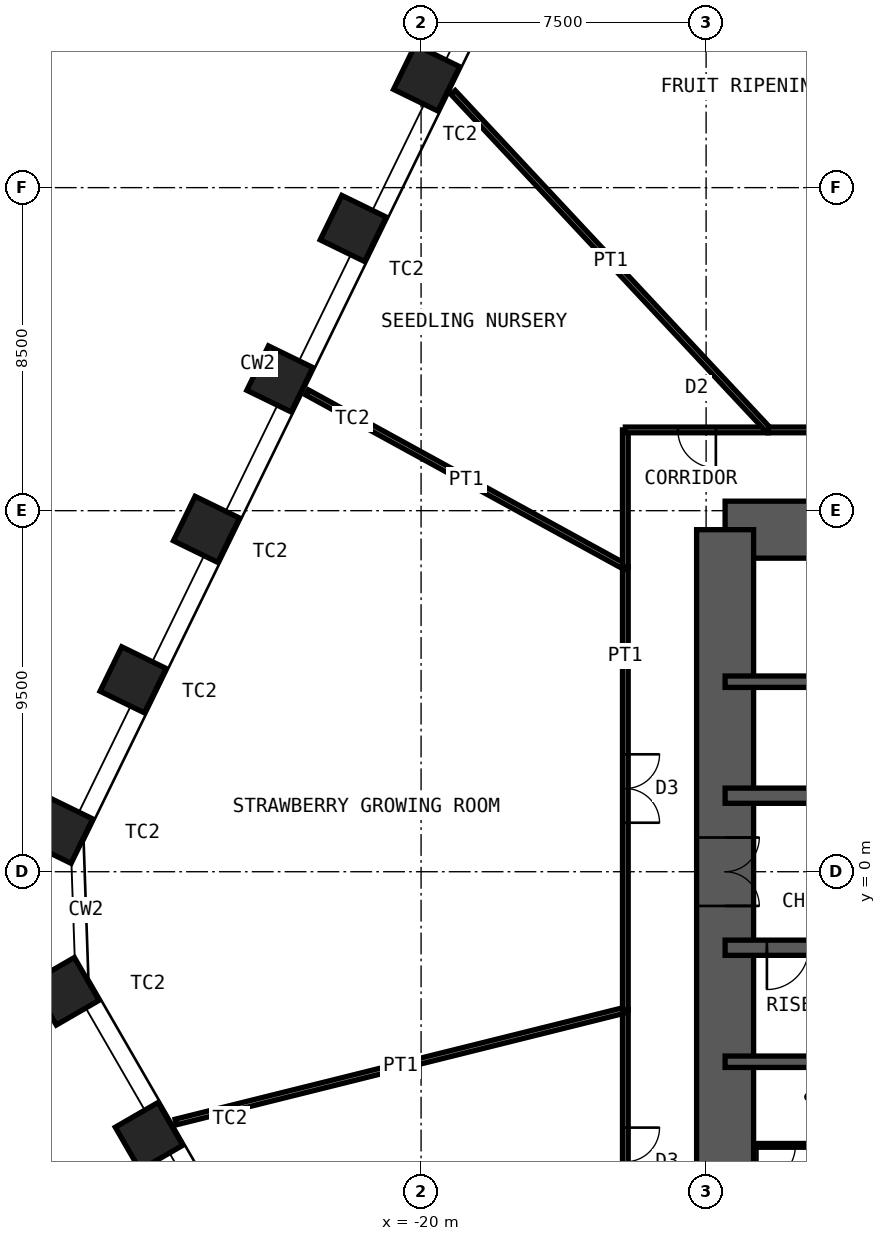
"""IFC4 building model, lengths in metres.
Left out: names, types, materials, properties, quantities, classifications, styles, units other than length and angle.
Written with IfcOpenShell. Run it as: python <this file> out.ifc"""

import sys

from ifc_helpers import new_model, si_unit, direction, frame, frame_2d, origin, origin_2d, place, context, subcontext, project, spatial, rectangle, hollow_rectangle, extrude, element, fill, save


model = new_model("IFC4")
c1 = context("Model", 3, precision=1e-05, world=origin(), true_north=direction((0.0, 1.0)))
c2 = subcontext(c1, "Body", "Model", "MODEL_VIEW")
j1 = project(units=[si_unit("LENGTHUNIT", "METRE"), si_unit("PLANEANGLEUNIT", "RADIAN")], contexts=[c1])
p1 = place(None, origin())
s1 = spatial("IfcSite", under=j1, at=p1, CompositionType="ELEMENT")
p2 = place(p1, origin())
s2 = spatial("IfcBuilding", under=s1, at=p2, CompositionType="ELEMENT")
p3 = place(p2, frame((0.0, 0.0, 72.0)))
s3 = spatial("IfcBuildingStorey", under=s2, at=p3, CompositionType="ELEMENT", Elevation=72.0)
for number, where, z_axis, x_axis in (
    (1, (-27.158, -6.96, 0.0), (0.0, 0.0, 1.0), (0.5, -0.866, 0.0)),
    (2, (-29.361, -3.146, 0.0), (0.0, 0.0, 1.0), (0.5, -0.866, 0.0)),
    (3, (-29.509, 1.09, 0.0), (0.0, 0.0, 1.0), (-0.438, -0.899, 0.0)),
    (4, (-27.578, 5.049, 0.0), (0.0, 0.0, 1.0), (-0.438, -0.899, 0.0)),
    (5, (-25.647, 9.008, 0.0), (0.0, 0.0, 1.0), (-0.438, -0.899, 0.0)),
    (6, (-23.716, 12.966, 0.0), (0.0, 0.0, 1.0), (-0.438, -0.899, 0.0)),
    (7, (-21.785, 16.925, 0.0), (0.0, 0.0, 1.0), (-0.438, -0.899, 0.0)),
    (8, (-19.854, 20.884, 0.0), (0.0, 0.0, 1.0), (-0.438, -0.899, 0.0)),
):
    element("IfcColumn", number, at=place(p3, frame(where, z_axis=z_axis, x_axis=x_axis)), inside=s3, PredefinedType="COLUMN", context=c2, shape_type="SweptSolid", body=[
        extrude(hollow_rectangle(XDim=1.3, YDim=1.3, WallThickness=0.1, at=origin_2d()), origin(), (0.0, 0.0, 1.0), 5.0),
    ])
p4 = place(p3, frame((-12.0, 9.0, 0.0), z_axis=(0.0, 0.0, 1.0), x_axis=(1.0, 0.0, 0.0)))
e9 = element("IfcWall", 9, at=p4, inside=s3, PredefinedType="SHEAR", context=c2, shape_type="SweptSolid", body=[
    extrude(rectangle(XDim=24.0, YDim=1.5, at=frame_2d((12.0, 0.0))), origin(), (0.0, 0.0, 1.0), 5.0),
])
p5 = place(p4, frame((10.4, 0.0, 0.0)))
e10 = element("IfcOpeningElement", 10, at=p5, cuts=e9, PredefinedType="OPENING", context=c2, shape_type="SweptSolid", body=[
    extrude(rectangle(XDim=1.0, YDim=2.1, at=frame_2d((0.5, 1.05))), frame((0.0, 0.76, 0.0), z_axis=(0.0, -1.0, 0.0), x_axis=(1.0, 0.0, 0.0)), (0.0, 0.0, 1.0), 1.52),
])
p6 = place(p4, frame((17.6, 0.0, 0.0)))
e11 = element("IfcOpeningElement", 11, at=p6, cuts=e9, PredefinedType="OPENING", context=c2, shape_type="SweptSolid", body=[
    extrude(rectangle(XDim=0.9, YDim=2.1, at=frame_2d((0.45, 1.05))), frame((0.0, 0.76, 0.0), z_axis=(0.0, -1.0, 0.0), x_axis=(1.0, 0.0, 0.0)), (0.0, 0.0, 1.0), 1.52),
])
p7 = place(p4, frame((21.9, 0.0, 0.0)))
e12 = element("IfcOpeningElement", 12, at=p7, cuts=e9, PredefinedType="OPENING", context=c2, shape_type="SweptSolid", body=[
    extrude(rectangle(XDim=0.9, YDim=2.1, at=frame_2d((0.45, 1.05))), frame((0.0, 0.76, 0.0), z_axis=(0.0, -1.0, 0.0), x_axis=(1.0, 0.0, 0.0)), (0.0, 0.0, 1.0), 1.52),
])
p8 = place(p3, frame((-12.0, -9.0, 0.0), z_axis=(0.0, 0.0, 1.0), x_axis=(0.0, 1.0, 0.0)))
e13 = element("IfcWall", 13, at=p8, inside=s3, PredefinedType="SHEAR", context=c2, shape_type="SweptSolid", body=[
    extrude(rectangle(XDim=18.0, YDim=1.5, at=frame_2d((9.0, 0.0))), origin(), (0.0, 0.0, 1.0), 5.0),
])
p9 = place(p8, frame((8.1, 0.0, 0.0)))
e14 = element("IfcOpeningElement", 14, at=p9, cuts=e13, PredefinedType="OPENING", context=c2, shape_type="SweptSolid", body=[
    extrude(rectangle(XDim=1.8, YDim=2.1, at=frame_2d((0.9, 1.05))), frame((0.0, 0.76, 0.0), z_axis=(0.0, -1.0, 0.0), x_axis=(1.0, 0.0, 0.0)), (0.0, 0.0, 1.0), 1.52),
])
p10 = place(p3, frame((-12.0, 5.0, 0.0), z_axis=(0.0, 0.0, 1.0), x_axis=(1.0, 0.0, 0.0)))
e15 = element("IfcWall", 15, at=p10, inside=s3, PredefinedType="SHEAR", context=c2, shape_type="SweptSolid", body=[
    extrude(rectangle(XDim=24.0, YDim=0.3, at=frame_2d((12.0, 0.0))), origin(), (0.0, 0.0, 1.0), 5.0),
])
p11 = place(p3, frame((-12.0, 2.0, 0.0), z_axis=(0.0, 0.0, 1.0), x_axis=(1.0, 0.0, 0.0)))
e16 = element("IfcWall", 16, at=p11, inside=s3, PredefinedType="SHEAR", context=c2, shape_type="SweptSolid", body=[
    extrude(rectangle(XDim=24.0, YDim=0.4, at=frame_2d((12.0, 0.0))), origin(), (0.0, 0.0, 1.0), 5.0),
])
p12 = place(p11, frame((2.4, 0.0, 0.0)))
e17 = element("IfcOpeningElement", 17, at=p12, cuts=e16, PredefinedType="OPENING", context=c2, shape_type="SweptSolid", body=[
    extrude(rectangle(XDim=1.1, YDim=2.1, at=frame_2d((0.55, 1.05))), frame((0.0, 0.21, 0.0), z_axis=(0.0, -1.0, 0.0), x_axis=(1.0, 0.0, 0.0)), (0.0, 0.0, 1.0), 0.42),
])
p13 = place(p11, frame((22.0, 0.0, 0.0)))
e18 = element("IfcOpeningElement", 18, at=p13, cuts=e16, PredefinedType="OPENING", context=c2, shape_type="SweptSolid", body=[
    extrude(rectangle(XDim=1.1, YDim=2.1, at=frame_2d((0.55, 1.05))), frame((0.0, 0.21, 0.0), z_axis=(0.0, -1.0, 0.0), x_axis=(1.0, 0.0, 0.0)), (0.0, 0.0, 1.0), 0.42),
])
p14 = place(p11, frame((10.15, 0.0, 0.0)))
e19 = element("IfcOpeningElement", 19, at=p14, cuts=e16, PredefinedType="OPENING", context=c2, shape_type="SweptSolid", body=[
    extrude(rectangle(XDim=1.0, YDim=2.1, at=frame_2d((0.5, 1.05))), frame((0.0, 0.21, 0.0), z_axis=(0.0, -1.0, 0.0), x_axis=(1.0, 0.0, 0.0)), (0.0, 0.0, 1.0), 0.42),
])
p15 = place(p11, frame((6.7, 0.0, 0.0)))
e20 = element("IfcOpeningElement", 20, at=p15, cuts=e16, PredefinedType="OPENING", context=c2, shape_type="SweptSolid", body=[
    extrude(rectangle(XDim=1.4, YDim=2.4, at=frame_2d((0.7, 1.2))), frame((0.0, 0.21, 0.0), z_axis=(0.0, -1.0, 0.0), x_axis=(1.0, 0.0, 0.0)), (0.0, 0.0, 1.0), 0.42),
])
p16 = place(p11, frame((13.35, 0.0, 0.0)))
e21 = element("IfcOpeningElement", 21, at=p16, cuts=e16, PredefinedType="OPENING", context=c2, shape_type="SweptSolid", body=[
    extrude(rectangle(XDim=1.1, YDim=2.4, at=frame_2d((0.55, 1.2))), frame((0.0, 0.21, 0.0), z_axis=(0.0, -1.0, 0.0), x_axis=(1.0, 0.0, 0.0)), (0.0, 0.0, 1.0), 0.42),
])
p17 = place(p11, frame((16.15, 0.0, 0.0)))
e22 = element("IfcOpeningElement", 22, at=p17, cuts=e16, PredefinedType="OPENING", context=c2, shape_type="SweptSolid", body=[
    extrude(rectangle(XDim=1.1, YDim=2.4, at=frame_2d((0.55, 1.2))), frame((0.0, 0.21, 0.0), z_axis=(0.0, -1.0, 0.0), x_axis=(1.0, 0.0, 0.0)), (0.0, 0.0, 1.0), 0.42),
])
p18 = place(p11, frame((18.95, 0.0, 0.0)))
e23 = element("IfcOpeningElement", 23, at=p18, cuts=e16, PredefinedType="OPENING", context=c2, shape_type="SweptSolid", body=[
    extrude(rectangle(XDim=1.1, YDim=2.4, at=frame_2d((0.55, 1.2))), frame((0.0, 0.21, 0.0), z_axis=(0.0, -1.0, 0.0), x_axis=(1.0, 0.0, 0.0)), (0.0, 0.0, 1.0), 0.42),
])
p19 = place(p3, frame((-12.0, -2.0, 0.0), z_axis=(0.0, 0.0, 1.0), x_axis=(1.0, 0.0, 0.0)))
e24 = element("IfcWall", 24, at=p19, inside=s3, PredefinedType="SHEAR", context=c2, shape_type="SweptSolid", body=[
    extrude(rectangle(XDim=24.0, YDim=0.4, at=frame_2d((12.0, 0.0))), origin(), (0.0, 0.0, 1.0), 5.0),
])
p20 = place(p19, frame((1.1, 0.0, 0.0)))
e25 = element("IfcOpeningElement", 25, at=p20, cuts=e24, PredefinedType="OPENING", context=c2, shape_type="SweptSolid", body=[
    extrude(rectangle(XDim=1.1, YDim=2.1, at=frame_2d((0.55, 1.05))), frame((0.0, 0.21, 0.0), z_axis=(0.0, -1.0, 0.0), x_axis=(1.0, 0.0, 0.0)), (0.0, 0.0, 1.0), 0.42),
])
p21 = place(p19, frame((13.55, 0.0, 0.0)))
e26 = element("IfcOpeningElement", 26, at=p21, cuts=e24, PredefinedType="OPENING", context=c2, shape_type="SweptSolid", body=[
    extrude(rectangle(XDim=1.1, YDim=2.1, at=frame_2d((0.55, 1.05))), frame((0.0, 0.21, 0.0), z_axis=(0.0, -1.0, 0.0), x_axis=(1.0, 0.0, 0.0)), (0.0, 0.0, 1.0), 0.42),
])
p22 = place(p19, frame((20.7, 0.0, 0.0)))
e27 = element("IfcOpeningElement", 27, at=p22, cuts=e24, PredefinedType="OPENING", context=c2, shape_type="SweptSolid", body=[
    extrude(rectangle(XDim=1.1, YDim=2.1, at=frame_2d((0.55, 1.05))), frame((0.0, 0.21, 0.0), z_axis=(0.0, -1.0, 0.0), x_axis=(1.0, 0.0, 0.0)), (0.0, 0.0, 1.0), 0.42),
])
p23 = place(p3, frame((-12.0, -5.0, 0.0), z_axis=(0.0, 0.0, 1.0), x_axis=(1.0, 0.0, 0.0)))
e28 = element("IfcWall", 28, at=p23, inside=s3, PredefinedType="SHEAR", context=c2, shape_type="SweptSolid", body=[
    extrude(rectangle(XDim=24.0, YDim=0.3, at=frame_2d((12.0, 0.0))), origin(), (0.0, 0.0, 1.0), 5.0),
])
p24 = place(p3, frame((-11.25, -7.2, 0.0), z_axis=(0.0, 0.0, 1.0), x_axis=(1.0, 0.0, 0.0)))
e29 = element("IfcWall", 29, at=p24, inside=s3, PredefinedType="PARTITIONING", context=c2, shape_type="SweptSolid", body=[
    extrude(rectangle(XDim=2.9, YDim=0.1, at=frame_2d((1.45, 0.0))), origin(), (0.0, 0.0, 1.0), 4.78),
])
p25 = place(p24, frame((0.1, 0.0, 0.0)))
e30 = element("IfcOpeningElement", 30, at=p25, cuts=e29, PredefinedType="OPENING", context=c2, shape_type="SweptSolid", body=[
    extrude(rectangle(XDim=1.0, YDim=2.4, at=frame_2d((0.5, 1.2))), frame((0.0, 0.06, 0.0), z_axis=(0.0, -1.0, 0.0), x_axis=(1.0, 0.0, 0.0)), (0.0, 0.0, 1.0), 0.12),
])
p26 = place(p3, frame((-14.625, -11.625, 0.0), z_axis=(0.0, 0.0, 1.0), x_axis=(0.0, 1.0, 0.0)))
e31 = element("IfcWall", 31, at=p26, inside=s3, PredefinedType="PARTITIONING", context=c2, shape_type="SweptSolid", body=[
    extrude(rectangle(XDim=7.984, YDim=0.15, at=frame_2d((3.992, 0.0))), origin(), (0.0, 0.0, 1.0), 4.8),
])
p27 = place(p26, frame((3.092, 0.0, 0.0)))
e32 = element("IfcOpeningElement", 32, at=p27, cuts=e31, PredefinedType="OPENING", context=c2, shape_type="SweptSolid", body=[
    extrude(rectangle(XDim=1.8, YDim=2.4, at=frame_2d((0.9, 1.2))), frame((0.0, 0.085, 0.0), z_axis=(0.0, -1.0, 0.0), x_axis=(1.0, 0.0, 0.0)), (0.0, 0.0, 1.0), 0.17),
])
p28 = place(p3, frame((-26.455, -6.586, 0.0), z_axis=(0.0, 0.0, 1.0), x_axis=(0.970383505188, 0.241569561118, 0.0)))
e33 = element("IfcWall", 33, at=p28, inside=s3, PredefinedType="PARTITIONING", context=c2, shape_type="SweptSolid", body=[
    extrude(rectangle(XDim=12.191, YDim=0.15, at=frame_2d((6.096, 0.0))), origin(), (0.0, 0.0, 1.0), 3.7),
])
p29 = place(p3, frame((-14.625, -3.641, 0.0), z_axis=(0.0, 0.0, 1.0), x_axis=(0.0, 1.0, 0.0)))
e34 = element("IfcWall", 34, at=p29, inside=s3, PredefinedType="PARTITIONING", context=c2, shape_type="SweptSolid", body=[
    extrude(rectangle(XDim=11.66, YDim=0.15, at=frame_2d((5.83, 0.0))), origin(), (0.0, 0.0, 1.0), 4.8),
])
p30 = place(p29, frame((4.93, 0.0, 0.0)))
e35 = element("IfcOpeningElement", 35, at=p30, cuts=e34, PredefinedType="OPENING", context=c2, shape_type="SweptSolid", body=[
    extrude(rectangle(XDim=1.8, YDim=2.4, at=frame_2d((0.9, 1.2))), frame((0.0, 0.085, 0.0), z_axis=(0.0, -1.0, 0.0), x_axis=(1.0, 0.0, 0.0)), (0.0, 0.0, 1.0), 0.17),
])
p31 = place(p3, frame((-22.999, 12.612, 0.0), z_axis=(0.0, 0.0, 1.0), x_axis=(0.876825619135, -0.480808520752, 0.0)))
e36 = element("IfcWall", 36, at=p31, inside=s3, PredefinedType="PARTITIONING", context=c2, shape_type="SweptSolid", body=[
    extrude(rectangle(XDim=9.551, YDim=0.15, at=frame_2d((4.775, 0.0))), origin(), (0.0, 0.0, 1.0), 3.7),
])
p32 = place(p3, frame((-14.625, 8.02, 0.0), z_axis=(0.0, 0.0, 1.0), x_axis=(0.0, 1.0, 0.0)))
e37 = element("IfcWall", 37, at=p32, inside=s3, PredefinedType="PARTITIONING", context=c2, shape_type="SweptSolid", body=[
    extrude(rectangle(XDim=3.605, YDim=0.15, at=frame_2d((1.803, 0.0))), origin(), (0.0, 0.0, 1.0), 4.8),
])
p33 = place(p3, frame((-14.625, 11.625, 0.0), z_axis=(0.0, 0.0, 1.0), x_axis=(1.0, 0.0, 0.0)))
e38 = element("IfcWall", 38, at=p33, inside=s3, PredefinedType="PARTITIONING", context=c2, shape_type="SweptSolid", body=[
    extrude(rectangle(XDim=3.764, YDim=0.15, at=frame_2d((1.882, 0.0))), origin(), (0.0, 0.0, 1.0), 4.8),
])
p34 = place(p33, frame((1.382, 0.0, 0.0)))
e39 = element("IfcOpeningElement", 39, at=p34, cuts=e38, PredefinedType="OPENING", context=c2, shape_type="SweptSolid", body=[
    extrude(rectangle(XDim=1.0, YDim=2.4, at=frame_2d((0.5, 1.2))), frame((0.0, 0.085, 0.0), z_axis=(0.0, -1.0, 0.0), x_axis=(1.0, 0.0, 0.0)), (0.0, 0.0, 1.0), 0.17),
])
p35 = place(p3, frame((-19.157, 20.504, 0.0), z_axis=(0.0, 0.0, 1.0), x_axis=(0.682689688298, -0.73070841619, 0.0)))
e40 = element("IfcWall", 40, at=p35, inside=s3, PredefinedType="PARTITIONING", context=c2, shape_type="SweptSolid", body=[
    extrude(rectangle(XDim=12.151, YDim=0.15, at=frame_2d((6.076, 0.0))), origin(), (0.0, 0.0, 1.0), 3.7),
])
p36 = place(p3, frame((-10.861, 11.625, 0.0), z_axis=(0.0, 0.0, 1.0), x_axis=(1.0, 0.0, 0.0)))
e41 = element("IfcWall", 41, at=p36, inside=s3, PredefinedType="PARTITIONING", context=c2, shape_type="SweptSolid", body=[
    extrude(rectangle(XDim=8.359, YDim=0.15, at=frame_2d((4.179, 0.0))), origin(), (0.0, 0.0, 1.0), 4.8),
])
p37 = place(p36, frame((3.279, 0.0, 0.0)))
e42 = element("IfcOpeningElement", 42, at=p37, cuts=e41, PredefinedType="OPENING", context=c2, shape_type="SweptSolid", body=[
    extrude(rectangle(XDim=1.8, YDim=2.4, at=frame_2d((0.9, 1.2))), frame((0.0, 0.085, 0.0), z_axis=(0.0, -1.0, 0.0), x_axis=(1.0, 0.0, 0.0)), (0.0, 0.0, 1.0), 0.17),
])
p38 = place(p20, origin())
e43 = element("IfcDoor", 43, at=p38, inside=s3, OperationType="SINGLE_SWING_LEFT", PredefinedType="DOOR", context=c2, shape_type="SweptSolid", body=[
    extrude(rectangle(XDim=1.1, YDim=2.1, at=frame_2d((0.55, 1.05))), frame((0.0, 0.025, 0.0), z_axis=(0.0, -1.0, 0.0), x_axis=(1.0, 0.0, 0.0)), (0.0, 0.0, 1.0), 0.05),
])
fill(e25, e43)
p39 = place(p9, origin())
e44 = element("IfcDoor", 44, at=p39, inside=s3, OperationType="DOUBLE_DOOR_DOUBLE_SWING", PredefinedType="DOOR", context=c2, shape_type="SweptSolid", body=[
    extrude(rectangle(XDim=1.8, YDim=2.1, at=frame_2d((0.9, 1.05))), frame((0.0, 0.025, 0.0), z_axis=(0.0, -1.0, 0.0), x_axis=(1.0, 0.0, 0.0)), (0.0, 0.0, 1.0), 0.05),
])
fill(e14, e44)
p40 = place(p25, origin())
e45 = element("IfcDoor", 45, at=p40, inside=s3, OperationType="SINGLE_SWING_LEFT", PredefinedType="DOOR", context=c2, shape_type="SweptSolid", body=[
    extrude(rectangle(XDim=1.0, YDim=2.4, at=frame_2d((0.5, 1.2))), frame((0.0, 0.025, 0.0), z_axis=(0.0, -1.0, 0.0), x_axis=(1.0, 0.0, 0.0)), (0.0, 0.0, 1.0), 0.05),
])
fill(e30, e45)
p41 = place(p27, origin())
e46 = element("IfcDoor", 46, at=p41, inside=s3, OperationType="DOUBLE_DOOR_DOUBLE_SWING", PredefinedType="DOOR", context=c2, shape_type="SweptSolid", body=[
    extrude(rectangle(XDim=1.8, YDim=2.4, at=frame_2d((0.9, 1.2))), frame((0.0, 0.025, 0.0), z_axis=(0.0, -1.0, 0.0), x_axis=(1.0, 0.0, 0.0)), (0.0, 0.0, 1.0), 0.05),
])
fill(e32, e46)
p42 = place(p30, origin())
e47 = element("IfcDoor", 47, at=p42, inside=s3, OperationType="DOUBLE_DOOR_DOUBLE_SWING", PredefinedType="DOOR", context=c2, shape_type="SweptSolid", body=[
    extrude(rectangle(XDim=1.8, YDim=2.4, at=frame_2d((0.9, 1.2))), frame((0.0, 0.025, 0.0), z_axis=(0.0, -1.0, 0.0), x_axis=(1.0, 0.0, 0.0)), (0.0, 0.0, 1.0), 0.05),
])
fill(e35, e47)
p43 = place(p34, origin())
e48 = element("IfcDoor", 48, at=p43, inside=s3, OperationType="SINGLE_SWING_RIGHT", PredefinedType="DOOR", context=c2, shape_type="SweptSolid", body=[
    extrude(rectangle(XDim=1.0, YDim=2.4, at=frame_2d((0.5, 1.2))), frame((0.0, 0.025, 0.0), z_axis=(0.0, -1.0, 0.0), x_axis=(1.0, 0.0, 0.0)), (0.0, 0.0, 1.0), 0.05),
])
fill(e39, e48)
save(model, sys.argv[1])
